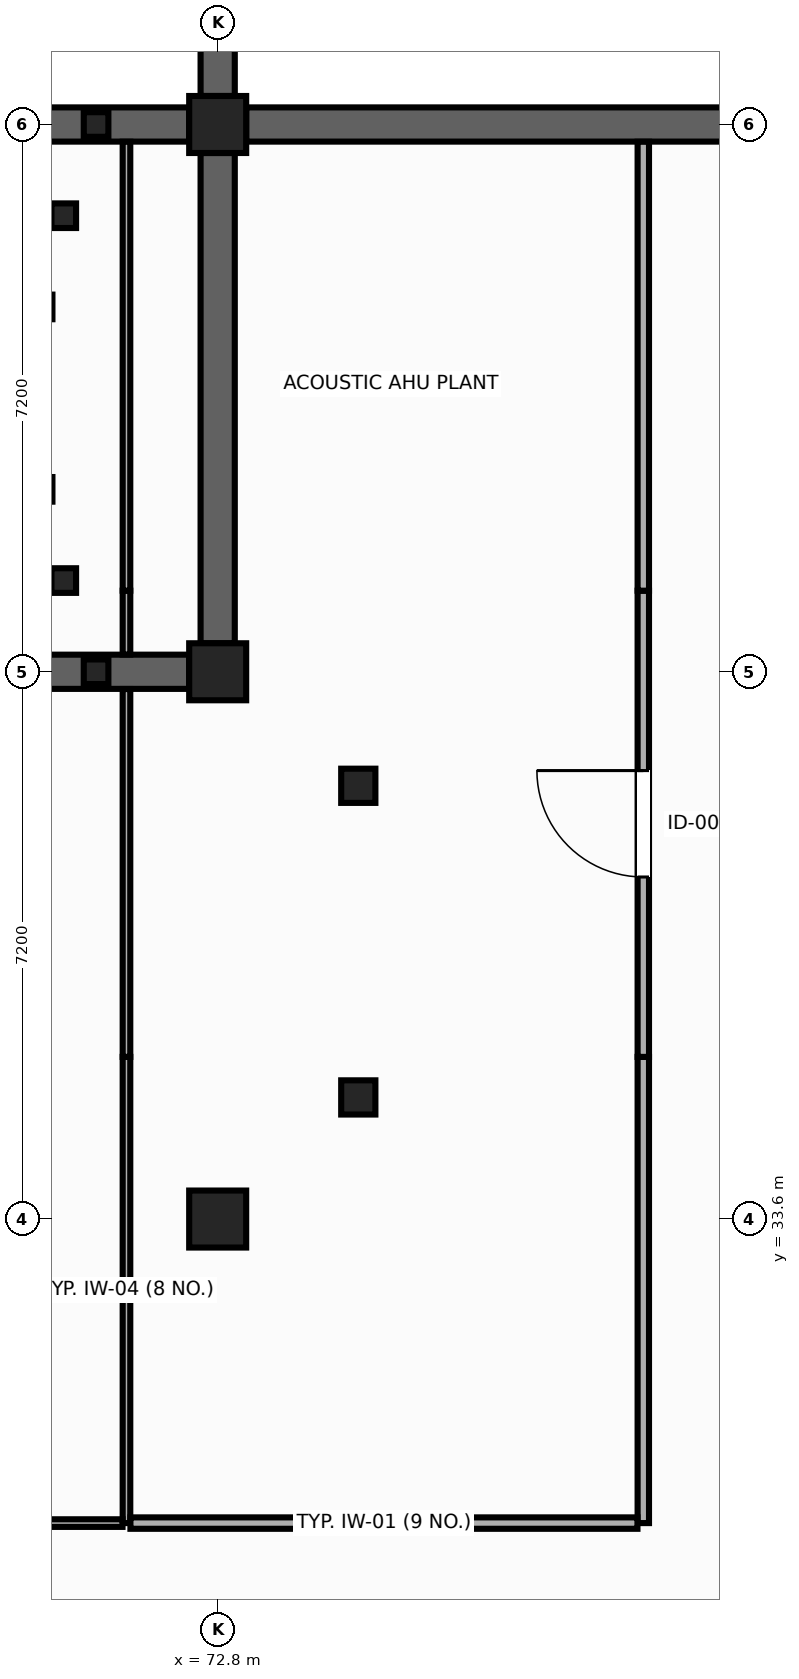
"""IFC4 building model, lengths in metres.
Left out: names, types, materials, properties, quantities, classifications, styles, units other than length and angle.
Written with IfcOpenShell. Run it as: python <this file> out.ifc"""

import sys

from ifc_helpers import new_model, si_unit, direction, frame, frame_2d, origin, origin_2d, place, context, subcontext, project, spatial, rectangle, hollow_circle, extrude, element, fill, save


model = new_model("IFC4")
c1 = context("Model", 3, precision=1e-05, world=origin(), true_north=direction((0.0, 1.0)))
c2 = subcontext(c1, "Body", "Model", "MODEL_VIEW")
j1 = project(units=[si_unit("LENGTHUNIT", "METRE"), si_unit("PLANEANGLEUNIT", "RADIAN")], contexts=[c1])
p1 = place(None, origin())
s1 = spatial("IfcSite", under=j1, at=p1, CompositionType="ELEMENT")
p2 = place(p1, origin())
s2 = spatial("IfcBuilding", under=s1, at=p2, CompositionType="ELEMENT")
p3 = place(p2, frame((0.0, 0.0, -4.8)))
s3 = spatial("IfcBuildingStorey", under=s2, at=p3, CompositionType="ELEMENT", Elevation=-4.8)
for number, where, z_axis, x_axis in (
    (1, (72.8, 33.6, 0.0), (0.0, 0.0, 1.0), (1.0, 0.0, 0.0)),
    (2, (72.8, 40.8, 0.0), (0.0, 0.0, 1.0), (0.0, 1.0, 0.0)),
    (3, (72.8, 48.0, 0.0), (0.0, 0.0, 1.0), (1.0, 0.0, 0.0)),
):
    element("IfcColumn", number, at=place(p3, frame(where, z_axis=z_axis, x_axis=x_axis)), inside=s3, PredefinedType="COLUMN", context=c2, shape_type="SweptSolid", body=[
        extrude(rectangle(XDim=0.75, YDim=0.75, at=origin_2d()), origin(), (0.0, 0.0, 1.0), 4.8),
    ])
for number, where, z_axis, x_axis in (
    (4, (74.65, 35.2, 0.0), (0.0, 0.0, 1.0), (1.0, 0.0, 0.0)),
    (5, (74.65, 39.3, 0.0), (0.0, 0.0, 1.0), (1.0, 0.0, 0.0)),
):
    element("IfcColumn", number, at=place(p3, frame(where, z_axis=z_axis, x_axis=x_axis)), inside=s3, PredefinedType="COLUMN", context=c2, shape_type="SweptSolid", body=[
        extrude(rectangle(XDim=0.45, YDim=0.45, at=origin_2d()), origin(), (0.0, 0.0, 1.0), 4.48),
    ])
for number, where, z_axis, x_axis in (
    (6, (70.464, 43.2, 0.0), (0.0, 0.0, 1.0), (1.0, 0.0, 0.0)),
    (7, (70.464, 45.6, 0.0), (0.0, 0.0, 1.0), (1.0, 0.0, 0.0)),
    (8, (70.775, 42.0, 0.0), (0.0, 0.0, 1.0), (1.0, 0.0, 0.0)),
    (9, (70.775, 46.8, 0.0), (0.0, 0.0, 1.0), (1.0, 0.0, 0.0)),
    (10, (71.2, 40.8, 0.0), (0.0, 0.0, 1.0), (1.0, 0.0, 0.0)),
    (11, (71.2, 48.0, 0.0), (0.0, 0.0, 1.0), (1.0, 0.0, 0.0)),
):
    element("IfcColumn", number, at=place(p3, frame(where, z_axis=z_axis, x_axis=x_axis)), inside=s3, PredefinedType="COLUMN", context=c2, shape_type="SweptSolid", body=[
        extrude(hollow_circle(Radius=0.162, WallThickness=0.016, at=origin_2d()), origin(), (0.0, 0.0, 1.0), 4.8),
    ])
p4 = place(p3, frame((65.975, 40.8, 0.0), z_axis=(0.0, 0.0, 1.0), x_axis=(1.0, 0.0, 0.0)))
e12 = element("IfcWall", 12, at=p4, inside=s3, PredefinedType="SHEAR", context=c2, shape_type="SweptSolid", body=[
    extrude(rectangle(XDim=6.45, YDim=0.45, at=frame_2d((3.225, 0.0))), origin(), (0.0, 0.0, 1.0), 4.48),
])
for number, where, z_axis, x_axis in (
    (13, (72.8, 41.175, 0.0), (0.0, 0.0, 1.0), (0.0, 1.0, 0.0)),
    (14, (72.8, 48.375, 0.0), (0.0, 0.0, 1.0), (0.0, 1.0, 0.0)),
):
    element("IfcWall", number, at=place(p3, frame(where, z_axis=z_axis, x_axis=x_axis)), inside=s3, PredefinedType="SHEAR", context=c2, shape_type="SweptSolid", body=[
        extrude(rectangle(XDim=6.45, YDim=0.45, at=frame_2d((3.225, 0.0))), origin(), (0.0, 0.0, 1.0), 4.5),
    ])
p5 = place(p3, frame((65.6, 48.0, 0.0), z_axis=(0.0, 0.0, 1.0), x_axis=(1.0, 0.0, 0.0)))
e15 = element("IfcWall", 15, at=p5, inside=s3, PredefinedType="SHEAR", context=c2, shape_type="SweptSolid", body=[
    extrude(rectangle(XDim=6.825, YDim=0.45, at=frame_2d((3.413, 0.0))), origin(), (0.0, 0.0, 1.0), 4.5),
])
p6 = place(p3, frame((73.175, 48.0, 0.0), z_axis=(0.0, 0.0, 1.0), x_axis=(1.0, 0.0, 0.0)))
e16 = element("IfcWall", 16, at=p6, inside=s3, PredefinedType="SHEAR", context=c2, shape_type="SweptSolid", body=[
    extrude(rectangle(XDim=6.45, YDim=0.45, at=frame_2d((3.225, 0.0))), origin(), (0.0, 0.0, 1.0), 4.5),
])
p7 = place(p3, frame((71.6, 29.6, 0.0), z_axis=(0.0, 0.0, 1.0), x_axis=(0.0, 1.0, 0.0)))
e17 = element("IfcWall", 17, at=p7, inside=s3, PredefinedType="PARTITIONING", context=c2, shape_type="SweptSolid", body=[
    extrude(rectangle(XDim=6.133, YDim=0.1, at=frame_2d((3.067, 0.0))), origin(), (0.0, 0.0, 1.0), 3.525),
])
p8 = place(p3, frame((71.6, 35.733, 0.0), z_axis=(0.0, 0.0, 1.0), x_axis=(0.0, 1.0, 0.0)))
e18 = element("IfcWall", 18, at=p8, inside=s3, PredefinedType="PARTITIONING", context=c2, shape_type="SweptSolid", body=[
    extrude(rectangle(XDim=4.84, YDim=0.1, at=frame_2d((2.42, 0.0))), origin(), (0.0, 0.0, 1.0), 4.025),
])
p9 = place(p3, frame((71.6, 41.027, 0.0), z_axis=(0.0, 0.0, 1.0), x_axis=(0.0, 1.0, 0.0)))
e19 = element("IfcWall", 19, at=p9, inside=s3, PredefinedType="PARTITIONING", context=c2, shape_type="SweptSolid", body=[
    extrude(rectangle(XDim=0.84, YDim=0.1, at=frame_2d((0.42, 0.0))), origin(), (0.0, 0.0, 1.0), 4.48),
])
p10 = place(p3, frame((71.6, 41.867, 0.0), z_axis=(0.0, 0.0, 1.0), x_axis=(0.0, 1.0, 0.0)))
e20 = element("IfcWall", 20, at=p10, inside=s3, PredefinedType="PARTITIONING", context=c2, shape_type="SweptSolid", body=[
    extrude(rectangle(XDim=5.906, YDim=0.1, at=frame_2d((2.953, 0.0))), origin(), (0.0, 0.0, 1.0), 4.5),
])
p11 = place(p3, frame((65.0, 29.6, 0.0), z_axis=(0.0, 0.0, 1.0), x_axis=(1.0, 0.0, 0.0)))
e21 = element("IfcWall", 21, at=p11, inside=s3, PredefinedType="PARTITIONING", context=c2, shape_type="SweptSolid", body=[
    extrude(rectangle(XDim=6.548, YDim=0.1, at=frame_2d((3.274, 0.0))), origin(), (0.0, 0.0, 1.0), 3.675),
])
p12 = place(p11, frame((2.574, 0.0, 0.0)))
e22 = element("IfcOpeningElement", 22, at=p12, cuts=e21, PredefinedType="OPENING", context=c2, shape_type="SweptSolid", body=[
    extrude(rectangle(XDim=1.4, YDim=2.2, at=frame_2d((0.7, 1.1))), frame((0.0, 0.06, 0.0), z_axis=(0.0, -1.0, 0.0), x_axis=(1.0, 0.0, 0.0)), (0.0, 0.0, 1.0), 0.12),
])
p13 = place(p3, frame((78.4, 29.6, 0.0), z_axis=(0.0, 0.0, 1.0), x_axis=(0.0, 1.0, 0.0)))
e23 = element("IfcWall", 23, at=p13, inside=s3, PredefinedType="PARTITIONING", context=c2, shape_type="SweptSolid", body=[
    extrude(rectangle(XDim=6.133, YDim=0.15, at=frame_2d((3.067, 0.0))), origin(), (0.0, 0.0, 1.0), 3.525),
])
p14 = place(p3, frame((78.4, 35.733, 0.0), z_axis=(0.0, 0.0, 1.0), x_axis=(0.0, 1.0, 0.0)))
e24 = element("IfcWall", 24, at=p14, inside=s3, PredefinedType="PARTITIONING", context=c2, shape_type="SweptSolid", body=[
    extrude(rectangle(XDim=6.133, YDim=0.15, at=frame_2d((3.067, 0.0))), origin(), (0.0, 0.0, 1.0), 3.525),
])
p15 = place(p14, frame((2.367, 0.0, 0.0)))
e25 = element("IfcOpeningElement", 25, at=p15, cuts=e24, PredefinedType="OPENING", context=c2, shape_type="SweptSolid", body=[
    extrude(rectangle(XDim=1.4, YDim=2.2, at=frame_2d((0.7, 1.1))), frame((0.0, 0.085, 0.0), z_axis=(0.0, -1.0, 0.0), x_axis=(1.0, 0.0, 0.0)), (0.0, 0.0, 1.0), 0.17),
])
p16 = place(p3, frame((78.4, 41.867, 0.0), z_axis=(0.0, 0.0, 1.0), x_axis=(0.0, 1.0, 0.0)))
e26 = element("IfcWall", 26, at=p16, inside=s3, PredefinedType="PARTITIONING", context=c2, shape_type="SweptSolid", body=[
    extrude(rectangle(XDim=5.906, YDim=0.15, at=frame_2d((2.953, 0.0))), origin(), (0.0, 0.0, 1.0), 4.045),
])
p17 = place(p3, frame((71.652, 29.6, 0.0), z_axis=(0.0, 0.0, 1.0), x_axis=(1.0, 0.0, 0.0)))
e27 = element("IfcWall", 27, at=p17, inside=s3, PredefinedType="PARTITIONING", context=c2, shape_type="SweptSolid", body=[
    extrude(rectangle(XDim=6.671, YDim=0.15, at=frame_2d((3.335, 0.0))), origin(), (0.0, 0.0, 1.0), 3.675),
])
p18 = place(p15, origin())
e28 = element("IfcDoor", 28, at=p18, inside=s3, OperationType="SINGLE_SWING_RIGHT", PredefinedType="DOOR", context=c2, shape_type="SweptSolid", body=[
    extrude(rectangle(XDim=1.4, YDim=2.2, at=frame_2d((0.7, 1.1))), frame((0.0, 0.025, 0.0), z_axis=(0.0, -1.0, 0.0), x_axis=(1.0, 0.0, 0.0)), (0.0, 0.0, 1.0), 0.05),
])
fill(e25, e28)
save(model, sys.argv[1])
